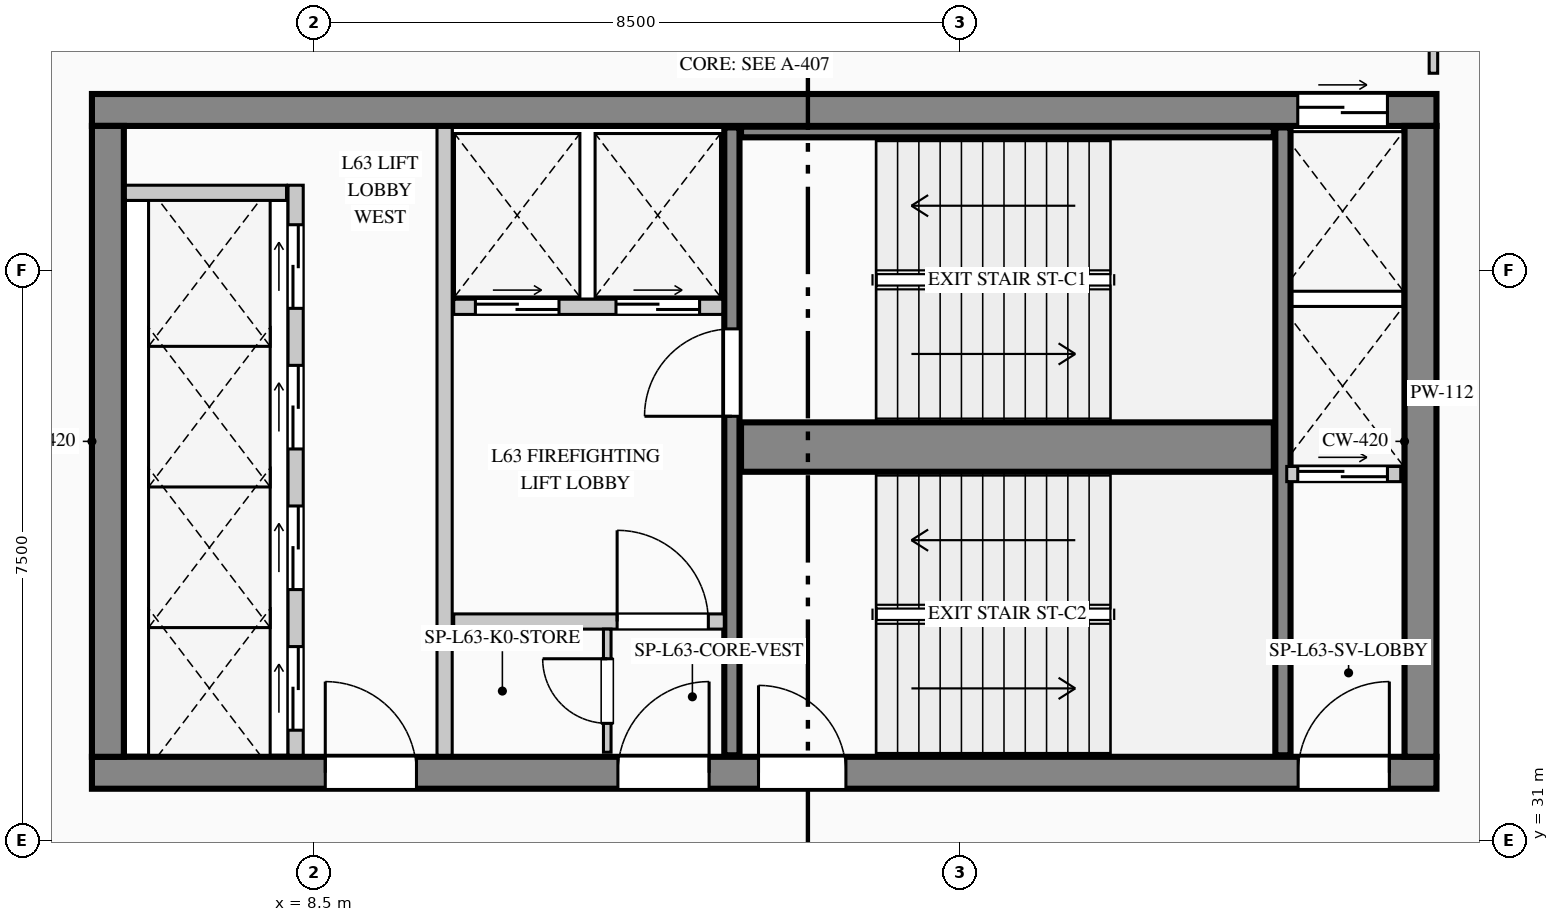
"""IFC4 building model, lengths in metres.
Left out: names, types, materials, properties, quantities, classifications, styles, units other than length and angle.
Written with IfcOpenShell. Run it as: python <this file> out.ifc"""

import sys

from ifc_helpers import new_model, si_unit, direction, frame, frame_2d, origin, place, context, subcontext, project, spatial, rectangle, extrude, element, fill, save


model = new_model("IFC4")
c1 = context("Model", 3, precision=1e-05, world=origin(), true_north=direction((0.0, 1.0)))
c2 = subcontext(c1, "Body", "Model", "MODEL_VIEW")
j1 = project(units=[si_unit("LENGTHUNIT", "METRE"), si_unit("PLANEANGLEUNIT", "RADIAN")], contexts=[c1])
p1 = place(None, origin())
s1 = spatial("IfcSite", under=j1, at=p1, CompositionType="ELEMENT")
p2 = place(p1, origin())
s2 = spatial("IfcBuilding", under=s1, at=p2, CompositionType="ELEMENT")
p3 = place(p2, frame((0.0, 0.0, 264.6)))
s3 = spatial("IfcBuildingStorey", under=s2, at=p3, CompositionType="ELEMENT", Elevation=264.6)
p4 = place(p3, frame((5.58, 40.61, 0.0), z_axis=(0.0, 0.0, 1.0), x_axis=(1.0, 0.0, 0.0)))
e1 = element("IfcWall", 1, at=p4, inside=s3, PredefinedType="SHEAR", context=c2, shape_type="SweptSolid", body=[
    extrude(rectangle(XDim=17.69, YDim=0.42, at=frame_2d((8.845, 0.0))), origin(), (0.0, 0.0, 1.0), 3.95),
])
p5 = place(p4, frame((15.865, 0.0, 0.0)))
e2 = element("IfcOpeningElement", 2, at=p5, cuts=e1, PredefinedType="OPENING", context=c2, shape_type="SweptSolid", body=[
    extrude(rectangle(XDim=1.18, YDim=2.25, at=frame_2d((0.59, 1.125))), frame((0.0, 0.22, 0.0), z_axis=(0.0, -1.0, 0.0), x_axis=(1.0, 0.0, 0.0)), (0.0, 0.0, 1.0), 0.44),
])
p6 = place(p3, frame((5.58, 31.89, 0.0), z_axis=(0.0, 0.0, 1.0), x_axis=(1.0, 0.0, 0.0)))
e3 = element("IfcWall", 3, at=p6, inside=s3, PredefinedType="SHEAR", context=c2, shape_type="SweptSolid", body=[
    extrude(rectangle(XDim=17.69, YDim=0.42, at=frame_2d((8.845, 0.0))), origin(), (0.0, 0.0, 1.0), 3.95),
])
p7 = place(p6, frame((3.07, 0.0, 0.0)))
e4 = element("IfcOpeningElement", 4, at=p7, cuts=e3, PredefinedType="OPENING", context=c2, shape_type="SweptSolid", body=[
    extrude(rectangle(XDim=1.2, YDim=2.2, at=frame_2d((0.6, 1.1))), frame((0.0, 0.22, 0.0), z_axis=(0.0, -1.0, 0.0), x_axis=(1.0, 0.0, 0.0)), (0.0, 0.0, 1.0), 0.44),
])
p8 = place(p6, frame((6.92, 0.0, 0.0)))
e5 = element("IfcOpeningElement", 5, at=p8, cuts=e3, PredefinedType="OPENING", context=c2, shape_type="SweptSolid", body=[
    extrude(rectangle(XDim=1.2, YDim=2.2, at=frame_2d((0.6, 1.1))), frame((0.0, 0.22, 0.0), z_axis=(0.0, -1.0, 0.0), x_axis=(1.0, 0.0, 0.0)), (0.0, 0.0, 1.0), 0.44),
])
p9 = place(p6, frame((8.77, 0.0, 0.0)))
e6 = element("IfcOpeningElement", 6, at=p9, cuts=e3, PredefinedType="OPENING", context=c2, shape_type="SweptSolid", body=[
    extrude(rectangle(XDim=1.15, YDim=2.2, at=frame_2d((0.575, 1.1))), frame((0.0, 0.22, 0.0), z_axis=(0.0, -1.0, 0.0), x_axis=(1.0, 0.0, 0.0)), (0.0, 0.0, 1.0), 0.44),
])
p10 = place(p6, frame((15.87, 0.0, 0.0)))
e7 = element("IfcOpeningElement", 7, at=p10, cuts=e3, PredefinedType="OPENING", context=c2, shape_type="SweptSolid", body=[
    extrude(rectangle(XDim=1.2, YDim=2.2, at=frame_2d((0.6, 1.1))), frame((0.0, 0.22, 0.0), z_axis=(0.0, -1.0, 0.0), x_axis=(1.0, 0.0, 0.0)), (0.0, 0.0, 1.0), 0.44),
])
for number, where, z_axis, x_axis in (
    (8, (5.79, 32.1, 0.0), (0.0, 0.0, 1.0), (0.0, 1.0, 0.0)),
    (9, (23.06, 32.1, 0.0), (0.0, 0.0, 1.0), (0.0, 1.0, 0.0)),
):
    element("IfcWall", number, at=place(p3, frame(where, z_axis=z_axis, x_axis=x_axis)), inside=s3, PredefinedType="SHEAR", context=c2, shape_type="SweptSolid", body=[
        extrude(rectangle(XDim=8.3, YDim=0.42, at=frame_2d((4.15, 0.0))), origin(), (0.0, 0.0, 1.0), 3.95),
    ])
p11 = place(p3, frame((14.0, 32.12, 0.0), z_axis=(0.0, 0.0, 1.0), x_axis=(0.0, 1.0, 0.0)))
e10 = element("IfcWall", 10, at=p11, inside=s3, PredefinedType="SHEAR", context=c2, shape_type="SweptSolid", body=[
    extrude(rectangle(XDim=8.26, YDim=0.2, at=frame_2d((4.13, 0.0))), origin(), (0.0, 0.0, 1.0), 3.95),
])
p12 = place(p11, frame((4.46, 0.0, 0.0)))
e11 = element("IfcOpeningElement", 11, at=p12, cuts=e10, PredefinedType="OPENING", context=c2, shape_type="SweptSolid", body=[
    extrude(rectangle(XDim=1.15, YDim=2.2, at=frame_2d((0.575, 1.1))), frame((0.0, 0.11, 0.0), z_axis=(0.0, -1.0, 0.0), x_axis=(1.0, 0.0, 0.0)), (0.0, 0.0, 1.0), 0.22),
])
p13 = place(p3, frame((14.12, 36.175, 0.0), z_axis=(0.0, 0.0, 1.0), x_axis=(1.0, 0.0, 0.0)))
e12 = element("IfcWall", 12, at=p13, inside=s3, PredefinedType="SHEAR", context=c2, shape_type="SweptSolid", body=[
    extrude(rectangle(XDim=7.01, YDim=0.65, at=frame_2d((3.505, 0.0))), origin(), (0.0, 0.0, 1.0), 3.95),
])
p14 = place(p3, frame((21.25, 32.12, 0.0), z_axis=(0.0, 0.0, 1.0), x_axis=(0.0, 1.0, 0.0)))
e13 = element("IfcWall", 13, at=p14, inside=s3, PredefinedType="SHEAR", context=c2, shape_type="SweptSolid", body=[
    extrude(rectangle(XDim=8.26, YDim=0.2, at=frame_2d((4.13, 0.0))), origin(), (0.0, 0.0, 1.0), 3.95),
])
p15 = place(p3, frame((14.12, 40.32, 0.0), z_axis=(0.0, 0.0, 1.0), x_axis=(1.0, 0.0, 0.0)))
e14 = element("IfcWall", 14, at=p15, inside=s3, PredefinedType="SHEAR", context=c2, shape_type="SweptSolid", body=[
    extrude(rectangle(XDim=7.01, YDim=0.14, at=frame_2d((3.505, 0.0))), origin(), (0.0, 0.0, 1.0), 3.95),
])
p16 = place(p3, frame((6.133, 4.42, 0.0), z_axis=(0.0, 0.0, 1.0), x_axis=(-0.089522678378, 0.995984784048, 0.0)))
e15 = element("IfcWall", 15, at=p16, inside=s3, PredefinedType="STANDARD", context=c2, shape_type="SweptSolid", body=[
    extrude(rectangle(XDim=37.31, YDim=0.24, at=frame_2d((18.655, 0.0))), origin(), (0.0, 0.0, 1.0), 3.7),
])
p17 = place(p16, frame((23.053, 0.0, 0.9)))
e16 = element("IfcOpeningElement", 16, at=p17, cuts=e15, PredefinedType="OPENING", context=c2, shape_type="SweptSolid", body=[
    extrude(rectangle(XDim=1.65, YDim=1.95, at=frame_2d((0.825, 0.975))), frame((0.0, 0.13, 0.0), z_axis=(0.0, -1.0, 0.0), x_axis=(1.0, 0.0, 0.0)), (0.0, 0.0, 1.0), 0.26),
])
p18 = place(p3, frame((8.26, 32.12, 0.0), z_axis=(0.0, 0.0, 1.0), x_axis=(0.0, 1.0, 0.0)))
e17 = element("IfcWall", 17, at=p18, inside=s3, PredefinedType="PARTITIONING", context=c2, shape_type="SweptSolid", body=[
    extrude(rectangle(XDim=7.5, YDim=0.2, at=frame_2d((3.75, 0.0))), origin(), (0.0, 0.0, 1.0), 3.7),
])
p19 = place(p18, frame((0.33, 0.0, 0.0)))
e18 = element("IfcOpeningElement", 18, at=p19, cuts=e17, PredefinedType="OPENING", context=c2, shape_type="SweptSolid", body=[
    extrude(rectangle(XDim=1.1, YDim=2.2, at=frame_2d((0.55, 1.1))), frame((0.0, 0.11, 0.0), z_axis=(0.0, -1.0, 0.0), x_axis=(1.0, 0.0, 0.0)), (0.0, 0.0, 1.0), 0.22),
])
p20 = place(p18, frame((2.18, 0.0, 0.0)))
e19 = element("IfcOpeningElement", 19, at=p20, cuts=e17, PredefinedType="OPENING", context=c2, shape_type="SweptSolid", body=[
    extrude(rectangle(XDim=1.1, YDim=2.2, at=frame_2d((0.55, 1.1))), frame((0.0, 0.11, 0.0), z_axis=(0.0, -1.0, 0.0), x_axis=(1.0, 0.0, 0.0)), (0.0, 0.0, 1.0), 0.22),
])
p21 = place(p18, frame((4.03, 0.0, 0.0)))
e20 = element("IfcOpeningElement", 20, at=p21, cuts=e17, PredefinedType="OPENING", context=c2, shape_type="SweptSolid", body=[
    extrude(rectangle(XDim=1.1, YDim=2.2, at=frame_2d((0.55, 1.1))), frame((0.0, 0.11, 0.0), z_axis=(0.0, -1.0, 0.0), x_axis=(1.0, 0.0, 0.0)), (0.0, 0.0, 1.0), 0.22),
])
p22 = place(p18, frame((5.88, 0.0, 0.0)))
e21 = element("IfcOpeningElement", 21, at=p22, cuts=e17, PredefinedType="OPENING", context=c2, shape_type="SweptSolid", body=[
    extrude(rectangle(XDim=1.1, YDim=2.2, at=frame_2d((0.55, 1.1))), frame((0.0, 0.11, 0.0), z_axis=(0.0, -1.0, 0.0), x_axis=(1.0, 0.0, 0.0)), (0.0, 0.0, 1.0), 0.22),
])
p23 = place(p3, frame((6.02, 39.52, 0.0), z_axis=(0.0, 0.0, 1.0), x_axis=(1.0, 0.0, 0.0)))
e22 = element("IfcWall", 22, at=p23, inside=s3, PredefinedType="PARTITIONING", context=c2, shape_type="SweptSolid", body=[
    extrude(rectangle(XDim=2.12, YDim=0.2, at=frame_2d((1.06, 0.0))), origin(), (0.0, 0.0, 1.0), 3.7),
])
p24 = place(p3, frame((10.22, 32.12, 0.0), z_axis=(0.0, 0.0, 1.0), x_axis=(0.0, 1.0, 0.0)))
e23 = element("IfcWall", 23, at=p24, inside=s3, PredefinedType="PARTITIONING", context=c2, shape_type="SweptSolid", body=[
    extrude(rectangle(XDim=8.26, YDim=0.2, at=frame_2d((4.13, 0.0))), origin(), (0.0, 0.0, 1.0), 3.7),
])
p25 = place(p3, frame((10.34, 38.02, 0.0), z_axis=(0.0, 0.0, 1.0), x_axis=(1.0, 0.0, 0.0)))
e24 = element("IfcWall", 24, at=p25, inside=s3, PredefinedType="PARTITIONING", context=c2, shape_type="SweptSolid", body=[
    extrude(rectangle(XDim=3.54, YDim=0.2, at=frame_2d((1.77, 0.0))), origin(), (0.0, 0.0, 1.0), 3.7),
])
p26 = place(p25, frame((0.285, 0.0, 0.0)))
e25 = element("IfcOpeningElement", 25, at=p26, cuts=e24, PredefinedType="OPENING", context=c2, shape_type="SweptSolid", body=[
    extrude(rectangle(XDim=1.1, YDim=2.2, at=frame_2d((0.55, 1.1))), frame((0.0, 0.11, 0.0), z_axis=(0.0, -1.0, 0.0), x_axis=(1.0, 0.0, 0.0)), (0.0, 0.0, 1.0), 0.22),
])
p27 = place(p25, frame((2.135, 0.0, 0.0)))
e26 = element("IfcOpeningElement", 26, at=p27, cuts=e24, PredefinedType="OPENING", context=c2, shape_type="SweptSolid", body=[
    extrude(rectangle(XDim=1.1, YDim=2.2, at=frame_2d((0.55, 1.1))), frame((0.0, 0.11, 0.0), z_axis=(0.0, -1.0, 0.0), x_axis=(1.0, 0.0, 0.0)), (0.0, 0.0, 1.0), 0.22),
])
p28 = place(p3, frame((10.34, 33.88, 0.0), z_axis=(0.0, 0.0, 1.0), x_axis=(1.0, 0.0, 0.0)))
e27 = element("IfcWall", 27, at=p28, inside=s3, PredefinedType="PARTITIONING", context=c2, shape_type="SweptSolid", body=[
    extrude(rectangle(XDim=3.56, YDim=0.2, at=frame_2d((1.78, 0.0))), origin(), (0.0, 0.0, 1.0), 3.7),
])
p29 = place(p28, frame((2.15, 0.0, 0.0)))
e28 = element("IfcOpeningElement", 28, at=p29, cuts=e27, PredefinedType="OPENING", context=c2, shape_type="SweptSolid", body=[
    extrude(rectangle(XDim=1.2, YDim=2.2, at=frame_2d((0.6, 1.1))), frame((0.0, 0.11, 0.0), z_axis=(0.0, -1.0, 0.0), x_axis=(1.0, 0.0, 0.0)), (0.0, 0.0, 1.0), 0.22),
])
p30 = place(p3, frame((12.36, 32.16, 0.0), z_axis=(0.0, 0.0, 1.0), x_axis=(0.0, 1.0, 0.0)))
e29 = element("IfcWall", 29, at=p30, inside=s3, PredefinedType="PARTITIONING", context=c2, shape_type="SweptSolid", body=[
    extrude(rectangle(XDim=1.62, YDim=0.1, at=frame_2d((0.81, 0.0))), origin(), (0.0, 0.0, 1.0), 3.7),
])
p31 = place(p30, frame((0.38, 0.0, 0.0)))
e30 = element("IfcOpeningElement", 30, at=p31, cuts=e29, PredefinedType="OPENING", context=c2, shape_type="SweptSolid", body=[
    extrude(rectangle(XDim=0.85, YDim=2.1, at=frame_2d((0.425, 1.05))), frame((0.0, 0.06, 0.0), z_axis=(0.0, -1.0, 0.0), x_axis=(1.0, 0.0, 0.0)), (0.0, 0.0, 1.0), 0.12),
])
p32 = place(p3, frame((21.3, 35.82, 0.0), z_axis=(0.0, 0.0, 1.0), x_axis=(1.0, 0.0, 0.0)))
e31 = element("IfcWall", 31, at=p32, inside=s3, PredefinedType="PARTITIONING", context=c2, shape_type="SweptSolid", body=[
    extrude(rectangle(XDim=1.5, YDim=0.2, at=frame_2d((0.75, 0.0))), origin(), (0.0, 0.0, 1.0), 3.7),
])
p33 = place(p32, frame((0.145, 0.0, 0.0)))
e32 = element("IfcOpeningElement", 32, at=p33, cuts=e31, PredefinedType="OPENING", context=c2, shape_type="SweptSolid", body=[
    extrude(rectangle(XDim=1.18, YDim=2.25, at=frame_2d((0.59, 1.125))), frame((0.0, 0.11, 0.0), z_axis=(0.0, -1.0, 0.0), x_axis=(1.0, 0.0, 0.0)), (0.0, 0.0, 1.0), 0.22),
])
p34 = place(p3, frame((23.23, 41.093, 0.0), z_axis=(0.0, 0.0, 1.0), x_axis=(0.0, 1.0, 0.0)))
e33 = element("IfcWall", 33, at=p34, inside=s3, PredefinedType="PARTITIONING", context=c2, shape_type="SweptSolid", body=[
    extrude(rectangle(XDim=2.182, YDim=0.112, at=frame_2d((1.091, 0.0))), origin(), (0.0, 0.0, 1.0), 3.7),
])
p35 = place(p7, origin())
e34 = element("IfcDoor", 34, at=p35, inside=s3, OperationType="SINGLE_SWING_LEFT", PredefinedType="DOOR", context=c2, shape_type="SweptSolid", body=[
    extrude(rectangle(XDim=1.2, YDim=2.2, at=frame_2d((0.6, 1.1))), frame((0.0, 0.025, 0.0), z_axis=(0.0, -1.0, 0.0), x_axis=(1.0, 0.0, 0.0)), (0.0, 0.0, 1.0), 0.05),
])
fill(e4, e34)
p36 = place(p8, origin())
e35 = element("IfcDoor", 35, at=p36, inside=s3, OperationType="SINGLE_SWING_RIGHT", PredefinedType="DOOR", context=c2, shape_type="SweptSolid", body=[
    extrude(rectangle(XDim=1.2, YDim=2.2, at=frame_2d((0.6, 1.1))), frame((0.0, 0.025, 0.0), z_axis=(0.0, -1.0, 0.0), x_axis=(1.0, 0.0, 0.0)), (0.0, 0.0, 1.0), 0.05),
])
fill(e5, e35)
p37 = place(p9, origin())
e36 = element("IfcDoor", 36, at=p37, inside=s3, OperationType="SINGLE_SWING_LEFT", PredefinedType="DOOR", context=c2, shape_type="SweptSolid", body=[
    extrude(rectangle(XDim=1.15, YDim=2.2, at=frame_2d((0.575, 1.1))), frame((0.0, 0.025, 0.0), z_axis=(0.0, -1.0, 0.0), x_axis=(1.0, 0.0, 0.0)), (0.0, 0.0, 1.0), 0.05),
])
fill(e6, e36)
p38 = place(p10, origin())
e37 = element("IfcDoor", 37, at=p38, inside=s3, OperationType="SINGLE_SWING_RIGHT", PredefinedType="DOOR", context=c2, shape_type="SweptSolid", body=[
    extrude(rectangle(XDim=1.2, YDim=2.2, at=frame_2d((0.6, 1.1))), frame((0.0, 0.025, 0.0), z_axis=(0.0, -1.0, 0.0), x_axis=(1.0, 0.0, 0.0)), (0.0, 0.0, 1.0), 0.05),
])
fill(e7, e37)
p39 = place(p29, origin())
e38 = element("IfcDoor", 38, at=p39, inside=s3, OperationType="SINGLE_SWING_LEFT", PredefinedType="DOOR", context=c2, shape_type="SweptSolid", body=[
    extrude(rectangle(XDim=1.2, YDim=2.2, at=frame_2d((0.6, 1.1))), frame((0.0, 0.025, 0.0), z_axis=(0.0, -1.0, 0.0), x_axis=(1.0, 0.0, 0.0)), (0.0, 0.0, 1.0), 0.05),
])
fill(e28, e38)
p40 = place(p31, origin())
e39 = element("IfcDoor", 39, at=p40, inside=s3, OperationType="SINGLE_SWING_RIGHT", PredefinedType="DOOR", context=c2, shape_type="SweptSolid", body=[
    extrude(rectangle(XDim=0.85, YDim=2.1, at=frame_2d((0.425, 1.05))), frame((0.0, 0.025, 0.0), z_axis=(0.0, -1.0, 0.0), x_axis=(1.0, 0.0, 0.0)), (0.0, 0.0, 1.0), 0.05),
])
fill(e30, e39)
p41 = place(p12, origin())
e40 = element("IfcDoor", 40, at=p41, inside=s3, OperationType="SINGLE_SWING_LEFT", PredefinedType="DOOR", context=c2, shape_type="SweptSolid", body=[
    extrude(rectangle(XDim=1.15, YDim=2.2, at=frame_2d((0.575, 1.1))), frame((0.0, 0.025, 0.0), z_axis=(0.0, -1.0, 0.0), x_axis=(1.0, 0.0, 0.0)), (0.0, 0.0, 1.0), 0.05),
])
fill(e11, e40)
p42 = place(p19, origin())
e41 = element("IfcDoor", 41, at=p42, inside=s3, OperationType="DOUBLE_DOOR_SLIDING", PredefinedType="DOOR", context=c2, shape_type="SweptSolid", body=[
    extrude(rectangle(XDim=1.1, YDim=2.2, at=frame_2d((0.55, 1.1))), frame((0.0, 0.025, 0.0), z_axis=(0.0, -1.0, 0.0), x_axis=(1.0, 0.0, 0.0)), (0.0, 0.0, 1.0), 0.05),
])
fill(e18, e41)
p43 = place(p20, origin())
e42 = element("IfcDoor", 42, at=p43, inside=s3, OperationType="DOUBLE_DOOR_SLIDING", PredefinedType="DOOR", context=c2, shape_type="SweptSolid", body=[
    extrude(rectangle(XDim=1.1, YDim=2.2, at=frame_2d((0.55, 1.1))), frame((0.0, 0.025, 0.0), z_axis=(0.0, -1.0, 0.0), x_axis=(1.0, 0.0, 0.0)), (0.0, 0.0, 1.0), 0.05),
])
fill(e19, e42)
p44 = place(p21, origin())
e43 = element("IfcDoor", 43, at=p44, inside=s3, OperationType="DOUBLE_DOOR_SLIDING", PredefinedType="DOOR", context=c2, shape_type="SweptSolid", body=[
    extrude(rectangle(XDim=1.1, YDim=2.2, at=frame_2d((0.55, 1.1))), frame((0.0, 0.025, 0.0), z_axis=(0.0, -1.0, 0.0), x_axis=(1.0, 0.0, 0.0)), (0.0, 0.0, 1.0), 0.05),
])
fill(e20, e43)
p45 = place(p22, origin())
e44 = element("IfcDoor", 44, at=p45, inside=s3, OperationType="DOUBLE_DOOR_SLIDING", PredefinedType="DOOR", context=c2, shape_type="SweptSolid", body=[
    extrude(rectangle(XDim=1.1, YDim=2.2, at=frame_2d((0.55, 1.1))), frame((0.0, 0.025, 0.0), z_axis=(0.0, -1.0, 0.0), x_axis=(1.0, 0.0, 0.0)), (0.0, 0.0, 1.0), 0.05),
])
fill(e21, e44)
p46 = place(p26, origin())
e45 = element("IfcDoor", 45, at=p46, inside=s3, OperationType="DOUBLE_DOOR_SLIDING", PredefinedType="DOOR", context=c2, shape_type="SweptSolid", body=[
    extrude(rectangle(XDim=1.1, YDim=2.2, at=frame_2d((0.55, 1.1))), frame((0.0, 0.025, 0.0), z_axis=(0.0, -1.0, 0.0), x_axis=(1.0, 0.0, 0.0)), (0.0, 0.0, 1.0), 0.05),
])
fill(e25, e45)
p47 = place(p27, origin())
e46 = element("IfcDoor", 46, at=p47, inside=s3, OperationType="DOUBLE_DOOR_SLIDING", PredefinedType="DOOR", context=c2, shape_type="SweptSolid", body=[
    extrude(rectangle(XDim=1.1, YDim=2.2, at=frame_2d((0.55, 1.1))), frame((0.0, 0.025, 0.0), z_axis=(0.0, -1.0, 0.0), x_axis=(1.0, 0.0, 0.0)), (0.0, 0.0, 1.0), 0.05),
])
fill(e26, e46)
p48 = place(p5, origin())
e47 = element("IfcDoor", 47, at=p48, inside=s3, OperationType="DOUBLE_DOOR_SLIDING", PredefinedType="DOOR", context=c2, shape_type="SweptSolid", body=[
    extrude(rectangle(XDim=1.18, YDim=2.25, at=frame_2d((0.59, 1.125))), frame((0.0, 0.025, 0.0), z_axis=(0.0, -1.0, 0.0), x_axis=(1.0, 0.0, 0.0)), (0.0, 0.0, 1.0), 0.05),
])
fill(e2, e47)
p49 = place(p33, origin())
e48 = element("IfcDoor", 48, at=p49, inside=s3, OperationType="DOUBLE_DOOR_SLIDING", PredefinedType="DOOR", context=c2, shape_type="SweptSolid", body=[
    extrude(rectangle(XDim=1.18, YDim=2.25, at=frame_2d((0.59, 1.125))), frame((0.0, 0.025, 0.0), z_axis=(0.0, -1.0, 0.0), x_axis=(1.0, 0.0, 0.0)), (0.0, 0.0, 1.0), 0.05),
])
fill(e32, e48)
save(model, sys.argv[1])
